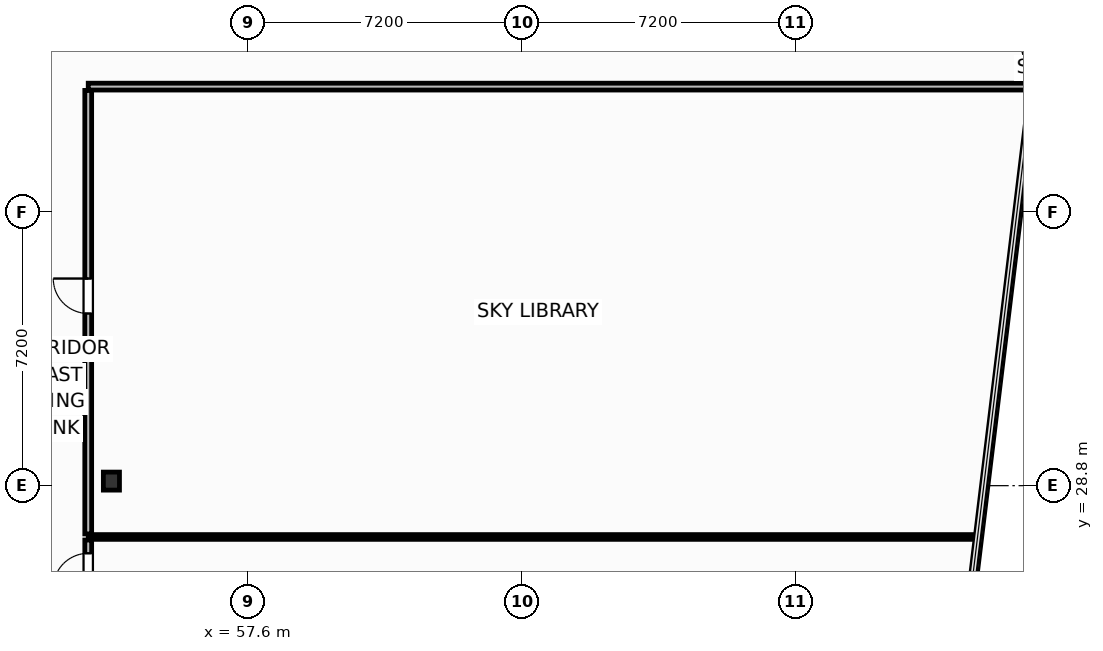
"""IFC4 building model, lengths in metres.
Left out: names, types, materials, properties, quantities, classifications, styles, units other than length and angle.
Written with IfcOpenShell. Run it as: python <this file> out.ifc"""

import sys

from ifc_helpers import new_model, si_unit, direction, frame, frame_2d, origin, origin_2d, place, context, subcontext, project, spatial, rectangle, i_section, extrude, element, fill, save


model = new_model("IFC4")
c1 = context("Model", 3, precision=1e-05, world=origin(), true_north=direction((0.0, 1.0)))
c2 = subcontext(c1, "Body", "Model", "MODEL_VIEW")
j1 = project(units=[si_unit("LENGTHUNIT", "METRE"), si_unit("PLANEANGLEUNIT", "RADIAN")], contexts=[c1])
p1 = place(None, origin())
s1 = spatial("IfcSite", under=j1, at=p1, CompositionType="ELEMENT")
p2 = place(p1, origin())
s2 = spatial("IfcBuilding", under=s1, at=p2, CompositionType="ELEMENT")
p3 = place(p2, frame((0.0, 0.0, 129.1)))
s3 = spatial("IfcBuildingStorey", under=s2, at=p3, CompositionType="ELEMENT", Elevation=129.1)
p4 = place(p3, frame((54.0, 28.92, 0.0), z_axis=(0.0, 0.0, 1.0), x_axis=(1.0, 0.0, 0.0)))
e1 = element("IfcColumn", 1, at=p4, inside=s3, PredefinedType="COLUMN", context=c2, shape_type="SweptSolid", body=[
    extrude(i_section(OverallWidth=0.424, OverallDepth=0.474, WebThickness=0.048, FlangeThickness=0.077, FilletRadius=0.025, at=origin_2d()), origin(), (0.0, 0.0, 1.0), 3.7),
])
p5 = place(p3, frame((78.155, 40.109, 0.0), z_axis=(0.0, 0.0, 1.0), x_axis=(-0.268639368869, 0.963240826322, 0.0)))
e2 = element("IfcWall", 2, at=p5, inside=s3, PredefinedType="SOLIDWALL", context=c2, shape_type="SweptSolid", body=[
    extrude(rectangle(XDim=1.353, YDim=0.22, at=frame_2d((0.677, 0.0))), origin(), (0.0, 0.0, 1.0), 2.73),
])
p6 = place(p3, frame((53.39, 19.3, 0.0), z_axis=(0.0, 0.0, 1.0), x_axis=(0.0, 1.0, 0.0)))
e3 = element("IfcWall", 3, at=p6, inside=s3, PredefinedType="PARTITIONING", context=c2, shape_type="SweptSolid", body=[
    extrude(rectangle(XDim=8.07, YDim=0.18, at=frame_2d((4.035, 0.0))), origin(), (0.0, 0.0, 1.0), 3.45),
])
p7 = place(p6, frame((6.8, 0.0, 0.0)))
e4 = element("IfcOpeningElement", 4, at=p7, cuts=e3, PredefinedType="OPENING", context=c2, shape_type="SweptSolid", body=[
    extrude(rectangle(XDim=0.92, YDim=2.05, at=frame_2d((0.46, 1.025))), frame((0.0, 0.1, 0.0), z_axis=(0.0, -1.0, 0.0), x_axis=(1.0, 0.0, 0.0)), (0.0, 0.0, 1.0), 0.2),
])
p8 = place(p3, frame((53.39, 27.53, 0.0), z_axis=(0.0, 0.0, 1.0), x_axis=(0.0, 1.0, 0.0)))
e5 = element("IfcWall", 5, at=p8, inside=s3, PredefinedType="PARTITIONING", context=c2, shape_type="SweptSolid", body=[
    extrude(rectangle(XDim=11.67, YDim=0.18, at=frame_2d((5.835, 0.0))), origin(), (0.0, 0.0, 1.0), 3.45),
])
p9 = place(p8, frame((5.8, 0.0, 0.0)))
e6 = element("IfcOpeningElement", 6, at=p9, cuts=e5, PredefinedType="OPENING", context=c2, shape_type="SweptSolid", body=[
    extrude(rectangle(XDim=0.92, YDim=2.05, at=frame_2d((0.46, 1.025))), frame((0.0, 0.1, 0.0), z_axis=(0.0, -1.0, 0.0), x_axis=(1.0, 0.0, 0.0)), (0.0, 0.0, 1.0), 0.2),
])
p10 = place(p3, frame((53.39, 27.45, 0.0), z_axis=(0.0, 0.0, 1.0), x_axis=(1.0, 0.0, 0.0)))
e7 = element("IfcWall", 7, at=p10, inside=s3, PredefinedType="PARTITIONING", context=c2, shape_type="SweptSolid", body=[
    extrude(rectangle(XDim=23.362, YDim=0.125, at=frame_2d((11.681, 0.0))), origin(), (0.0, 0.0, 1.0), 3.45),
])
p11 = place(p3, frame((53.39, 39.3, 0.0), z_axis=(0.0, 0.0, 1.0), x_axis=(1.0, 0.0, 0.0)))
e8 = element("IfcWall", 8, at=p11, inside=s3, PredefinedType="PARTITIONING", context=c2, shape_type="SweptSolid", body=[
    extrude(rectangle(XDim=24.74, YDim=0.18, at=frame_2d((12.37, 0.0))), origin(), (0.0, 0.0, 1.0), 3.45),
])
p12 = place(p7, origin())
e9 = element("IfcDoor", 9, at=p12, inside=s3, OperationType="SINGLE_SWING_LEFT", PredefinedType="DOOR", context=c2, shape_type="SweptSolid", body=[
    extrude(rectangle(XDim=0.92, YDim=2.05, at=frame_2d((0.46, 1.025))), frame((0.0, 0.025, 0.0), z_axis=(0.0, -1.0, 0.0), x_axis=(1.0, 0.0, 0.0)), (0.0, 0.0, 1.0), 0.05),
])
fill(e4, e9)
p13 = place(p9, origin())
e10 = element("IfcDoor", 10, at=p13, inside=s3, OperationType="SINGLE_SWING_RIGHT", PredefinedType="DOOR", context=c2, shape_type="SweptSolid", body=[
    extrude(rectangle(XDim=0.92, YDim=2.05, at=frame_2d((0.46, 1.025))), frame((0.0, 0.025, 0.0), z_axis=(0.0, -1.0, 0.0), x_axis=(1.0, 0.0, 0.0)), (0.0, 0.0, 1.0), 0.05),
])
fill(e6, e10)
save(model, sys.argv[1])
